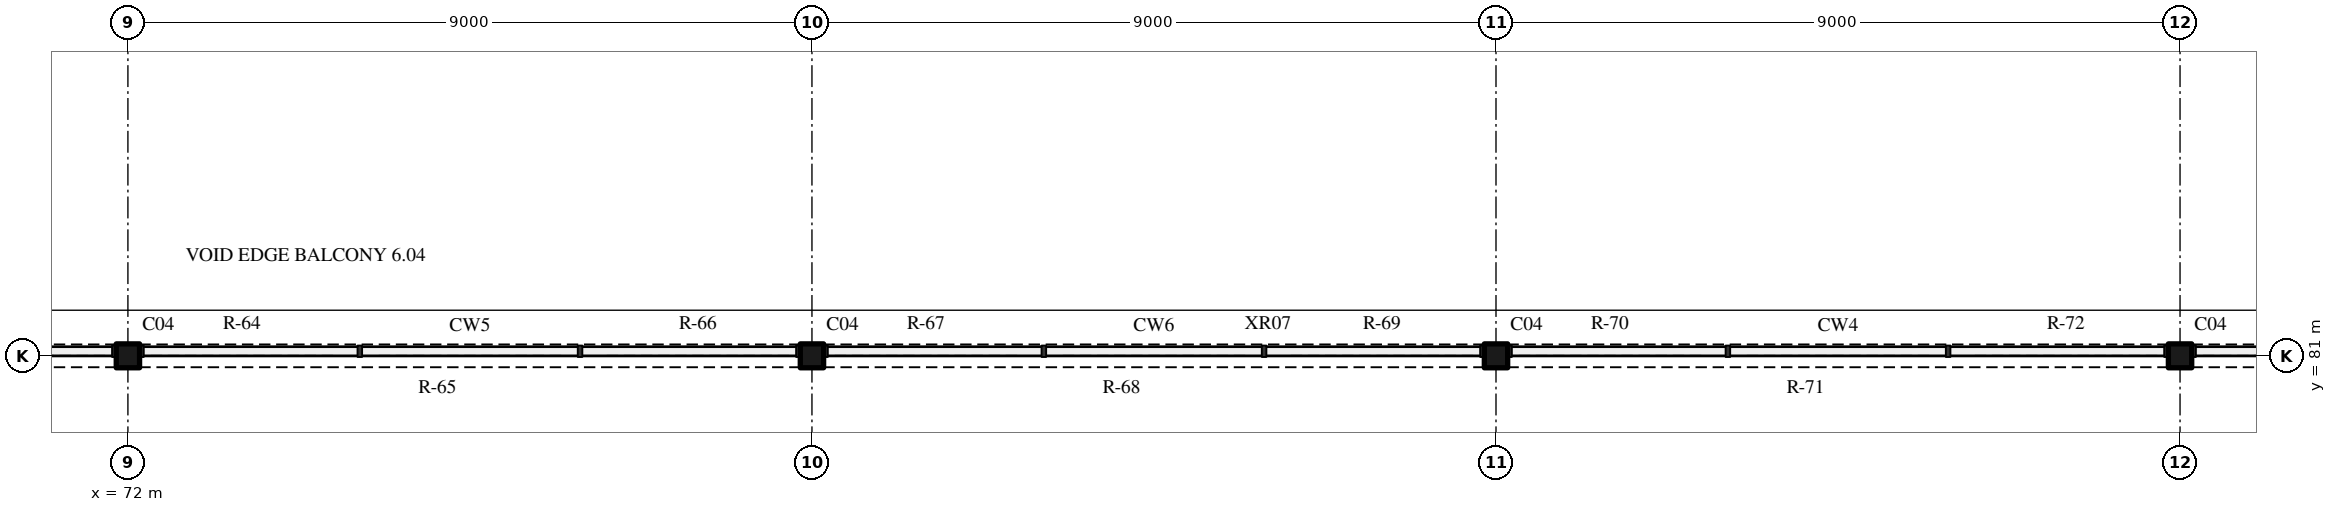
"""IFC4 building model, lengths in metres.
Left out: names, types, materials, properties, quantities, classifications, styles, units other than length and angle.
Written with IfcOpenShell. Run it as: python <this file> out.ifc"""

import sys

from ifc_helpers import new_model, si_unit, direction, frame, frame_2d, origin, origin_2d, place, context, subcontext, project, spatial, rectangle, i_section, extrude, element, fill, save


model = new_model("IFC4")
c1 = context("Model", 3, precision=1e-05, world=origin(), true_north=direction((0.0, 1.0)))
c2 = subcontext(c1, "Body", "Model", "MODEL_VIEW")
j1 = project(units=[si_unit("LENGTHUNIT", "METRE"), si_unit("PLANEANGLEUNIT", "RADIAN")], contexts=[c1])
p1 = place(None, origin())
s1 = spatial("IfcSite", under=j1, at=p1, CompositionType="ELEMENT")
p2 = place(p1, origin())
s2 = spatial("IfcBuilding", under=s1, at=p2, CompositionType="ELEMENT")
p3 = place(p2, frame((0.0, 0.0, 36.0)))
s3 = spatial("IfcBuildingStorey", under=s2, at=p3, CompositionType="ELEMENT", Elevation=36.0)
for number, where, z_axis, x_axis in (
    (1, (72.0, 81.0, 0.0), (0.0, 0.0, 1.0), (1.0, 0.0, 0.0)),
    (2, (81.0, 81.0, 0.0), (0.0, 0.0, 1.0), (1.0, 0.0, 0.0)),
    (3, (90.0, 81.0, 0.0), (0.0, 0.0, 1.0), (1.0, 0.0, 0.0)),
    (4, (99.0, 81.0, 0.0), (0.0, 0.0, 1.0), (1.0, 0.0, 0.0)),
):
    element("IfcColumn", number, at=place(p3, frame(where, z_axis=z_axis, x_axis=x_axis)), inside=s3, PredefinedType="COLUMN", context=c2, shape_type="SweptSolid", body=[
        extrude(i_section(OverallWidth=0.307, OverallDepth=0.315, WebThickness=0.012, FlangeThickness=0.019, FilletRadius=0.017, at=origin_2d()), origin(), (0.0, 0.0, 1.0), 8.0),
    ])
p4 = place(p3, frame((54.15, 81.0, 15.2), z_axis=(0.0, 0.0, 1.0), x_axis=(1.0, 0.0, 0.0)))
e5 = element("IfcWall", 5, at=p4, inside=s3, PredefinedType="SOLIDWALL", context=c2, shape_type="SweptSolid", body=[
    extrude(rectangle(XDim=62.7, YDim=0.3, at=frame_2d((31.35, 0.0))), origin(), (0.0, 0.0, 1.0), 0.9),
])
p5 = place(p4, frame((0.15, 0.0, 0.15)))
e6 = element("IfcOpeningElement", 6, at=p5, cuts=e5, PredefinedType="OPENING", context=c2, shape_type="SweptSolid", body=[
    extrude(rectangle(XDim=2.4, YDim=0.6, at=frame_2d((1.2, 0.3))), frame((0.0, 0.16, 0.0), z_axis=(0.0, -1.0, 0.0), x_axis=(1.0, 0.0, 0.0)), (0.0, 0.0, 1.0), 0.32),
])
p6 = place(p4, frame((3.15, 0.0, 0.15)))
e7 = element("IfcOpeningElement", 7, at=p6, cuts=e5, PredefinedType="OPENING", context=c2, shape_type="SweptSolid", body=[
    extrude(rectangle(XDim=2.4, YDim=0.6, at=frame_2d((1.2, 0.3))), frame((0.0, 0.16, 0.0), z_axis=(0.0, -1.0, 0.0), x_axis=(1.0, 0.0, 0.0)), (0.0, 0.0, 1.0), 0.32),
])
p7 = place(p4, frame((6.15, 0.0, 0.15)))
e8 = element("IfcOpeningElement", 8, at=p7, cuts=e5, PredefinedType="OPENING", context=c2, shape_type="SweptSolid", body=[
    extrude(rectangle(XDim=2.4, YDim=0.6, at=frame_2d((1.2, 0.3))), frame((0.0, 0.16, 0.0), z_axis=(0.0, -1.0, 0.0), x_axis=(1.0, 0.0, 0.0)), (0.0, 0.0, 1.0), 0.32),
])
p8 = place(p4, frame((9.15, 0.0, 0.15)))
e9 = element("IfcOpeningElement", 9, at=p8, cuts=e5, PredefinedType="OPENING", context=c2, shape_type="SweptSolid", body=[
    extrude(rectangle(XDim=2.4, YDim=0.6, at=frame_2d((1.2, 0.3))), frame((0.0, 0.16, 0.0), z_axis=(0.0, -1.0, 0.0), x_axis=(1.0, 0.0, 0.0)), (0.0, 0.0, 1.0), 0.32),
])
p9 = place(p4, frame((12.15, 0.0, 0.15)))
e10 = element("IfcOpeningElement", 10, at=p9, cuts=e5, PredefinedType="OPENING", context=c2, shape_type="SweptSolid", body=[
    extrude(rectangle(XDim=2.4, YDim=0.6, at=frame_2d((1.2, 0.3))), frame((0.0, 0.16, 0.0), z_axis=(0.0, -1.0, 0.0), x_axis=(1.0, 0.0, 0.0)), (0.0, 0.0, 1.0), 0.32),
])
p10 = place(p4, frame((15.15, 0.0, 0.15)))
e11 = element("IfcOpeningElement", 11, at=p10, cuts=e5, PredefinedType="OPENING", context=c2, shape_type="SweptSolid", body=[
    extrude(rectangle(XDim=2.4, YDim=0.6, at=frame_2d((1.2, 0.3))), frame((0.0, 0.16, 0.0), z_axis=(0.0, -1.0, 0.0), x_axis=(1.0, 0.0, 0.0)), (0.0, 0.0, 1.0), 0.32),
])
p11 = place(p4, frame((18.15, 0.0, 0.15)))
e12 = element("IfcOpeningElement", 12, at=p11, cuts=e5, PredefinedType="OPENING", context=c2, shape_type="SweptSolid", body=[
    extrude(rectangle(XDim=2.4, YDim=0.6, at=frame_2d((1.2, 0.3))), frame((0.0, 0.16, 0.0), z_axis=(0.0, -1.0, 0.0), x_axis=(1.0, 0.0, 0.0)), (0.0, 0.0, 1.0), 0.32),
])
p12 = place(p4, frame((21.15, 0.0, 0.15)))
e13 = element("IfcOpeningElement", 13, at=p12, cuts=e5, PredefinedType="OPENING", context=c2, shape_type="SweptSolid", body=[
    extrude(rectangle(XDim=2.4, YDim=0.6, at=frame_2d((1.2, 0.3))), frame((0.0, 0.16, 0.0), z_axis=(0.0, -1.0, 0.0), x_axis=(1.0, 0.0, 0.0)), (0.0, 0.0, 1.0), 0.32),
])
p13 = place(p4, frame((24.15, 0.0, 0.15)))
e14 = element("IfcOpeningElement", 14, at=p13, cuts=e5, PredefinedType="OPENING", context=c2, shape_type="SweptSolid", body=[
    extrude(rectangle(XDim=2.4, YDim=0.6, at=frame_2d((1.2, 0.3))), frame((0.0, 0.16, 0.0), z_axis=(0.0, -1.0, 0.0), x_axis=(1.0, 0.0, 0.0)), (0.0, 0.0, 1.0), 0.32),
])
p14 = place(p4, frame((27.15, 0.0, 0.15)))
e15 = element("IfcOpeningElement", 15, at=p14, cuts=e5, PredefinedType="OPENING", context=c2, shape_type="SweptSolid", body=[
    extrude(rectangle(XDim=2.4, YDim=0.6, at=frame_2d((1.2, 0.3))), frame((0.0, 0.16, 0.0), z_axis=(0.0, -1.0, 0.0), x_axis=(1.0, 0.0, 0.0)), (0.0, 0.0, 1.0), 0.32),
])
p15 = place(p4, frame((30.15, 0.0, 0.15)))
e16 = element("IfcOpeningElement", 16, at=p15, cuts=e5, PredefinedType="OPENING", context=c2, shape_type="SweptSolid", body=[
    extrude(rectangle(XDim=2.4, YDim=0.6, at=frame_2d((1.2, 0.3))), frame((0.0, 0.16, 0.0), z_axis=(0.0, -1.0, 0.0), x_axis=(1.0, 0.0, 0.0)), (0.0, 0.0, 1.0), 0.32),
])
p16 = place(p4, frame((33.15, 0.0, 0.15)))
e17 = element("IfcOpeningElement", 17, at=p16, cuts=e5, PredefinedType="OPENING", context=c2, shape_type="SweptSolid", body=[
    extrude(rectangle(XDim=2.4, YDim=0.6, at=frame_2d((1.2, 0.3))), frame((0.0, 0.16, 0.0), z_axis=(0.0, -1.0, 0.0), x_axis=(1.0, 0.0, 0.0)), (0.0, 0.0, 1.0), 0.32),
])
p17 = place(p4, frame((36.15, 0.0, 0.15)))
e18 = element("IfcOpeningElement", 18, at=p17, cuts=e5, PredefinedType="OPENING", context=c2, shape_type="SweptSolid", body=[
    extrude(rectangle(XDim=2.4, YDim=0.6, at=frame_2d((1.2, 0.3))), frame((0.0, 0.16, 0.0), z_axis=(0.0, -1.0, 0.0), x_axis=(1.0, 0.0, 0.0)), (0.0, 0.0, 1.0), 0.32),
])
p18 = place(p4, frame((39.15, 0.0, 0.15)))
e19 = element("IfcOpeningElement", 19, at=p18, cuts=e5, PredefinedType="OPENING", context=c2, shape_type="SweptSolid", body=[
    extrude(rectangle(XDim=2.4, YDim=0.6, at=frame_2d((1.2, 0.3))), frame((0.0, 0.16, 0.0), z_axis=(0.0, -1.0, 0.0), x_axis=(1.0, 0.0, 0.0)), (0.0, 0.0, 1.0), 0.32),
])
p19 = place(p4, frame((42.15, 0.0, 0.15)))
e20 = element("IfcOpeningElement", 20, at=p19, cuts=e5, PredefinedType="OPENING", context=c2, shape_type="SweptSolid", body=[
    extrude(rectangle(XDim=2.4, YDim=0.6, at=frame_2d((1.2, 0.3))), frame((0.0, 0.16, 0.0), z_axis=(0.0, -1.0, 0.0), x_axis=(1.0, 0.0, 0.0)), (0.0, 0.0, 1.0), 0.32),
])
p20 = place(p4, frame((45.15, 0.0, 0.15)))
e21 = element("IfcOpeningElement", 21, at=p20, cuts=e5, PredefinedType="OPENING", context=c2, shape_type="SweptSolid", body=[
    extrude(rectangle(XDim=2.4, YDim=0.6, at=frame_2d((1.2, 0.3))), frame((0.0, 0.16, 0.0), z_axis=(0.0, -1.0, 0.0), x_axis=(1.0, 0.0, 0.0)), (0.0, 0.0, 1.0), 0.32),
])
p21 = place(p4, frame((48.15, 0.0, 0.15)))
e22 = element("IfcOpeningElement", 22, at=p21, cuts=e5, PredefinedType="OPENING", context=c2, shape_type="SweptSolid", body=[
    extrude(rectangle(XDim=2.4, YDim=0.6, at=frame_2d((1.2, 0.3))), frame((0.0, 0.16, 0.0), z_axis=(0.0, -1.0, 0.0), x_axis=(1.0, 0.0, 0.0)), (0.0, 0.0, 1.0), 0.32),
])
p22 = place(p4, frame((51.15, 0.0, 0.15)))
e23 = element("IfcOpeningElement", 23, at=p22, cuts=e5, PredefinedType="OPENING", context=c2, shape_type="SweptSolid", body=[
    extrude(rectangle(XDim=2.4, YDim=0.6, at=frame_2d((1.2, 0.3))), frame((0.0, 0.16, 0.0), z_axis=(0.0, -1.0, 0.0), x_axis=(1.0, 0.0, 0.0)), (0.0, 0.0, 1.0), 0.32),
])
p23 = place(p4, frame((54.15, 0.0, 0.15)))
e24 = element("IfcOpeningElement", 24, at=p23, cuts=e5, PredefinedType="OPENING", context=c2, shape_type="SweptSolid", body=[
    extrude(rectangle(XDim=2.4, YDim=0.6, at=frame_2d((1.2, 0.3))), frame((0.0, 0.16, 0.0), z_axis=(0.0, -1.0, 0.0), x_axis=(1.0, 0.0, 0.0)), (0.0, 0.0, 1.0), 0.32),
])
p24 = place(p4, frame((57.15, 0.0, 0.15)))
e25 = element("IfcOpeningElement", 25, at=p24, cuts=e5, PredefinedType="OPENING", context=c2, shape_type="SweptSolid", body=[
    extrude(rectangle(XDim=2.4, YDim=0.6, at=frame_2d((1.2, 0.3))), frame((0.0, 0.16, 0.0), z_axis=(0.0, -1.0, 0.0), x_axis=(1.0, 0.0, 0.0)), (0.0, 0.0, 1.0), 0.32),
])
p25 = place(p4, frame((60.15, 0.0, 0.15)))
e26 = element("IfcOpeningElement", 26, at=p25, cuts=e5, PredefinedType="OPENING", context=c2, shape_type="SweptSolid", body=[
    extrude(rectangle(XDim=2.4, YDim=0.6, at=frame_2d((1.2, 0.3))), frame((0.0, 0.16, 0.0), z_axis=(0.0, -1.0, 0.0), x_axis=(1.0, 0.0, 0.0)), (0.0, 0.0, 1.0), 0.32),
])
p26 = place(p10, origin())
e27 = element("IfcWindow", 27, at=p26, inside=s3, PartitioningType="SINGLE_PANEL", PredefinedType="SKYLIGHT", context=c2, shape_type="SweptSolid", body=[
    extrude(rectangle(XDim=2.4, YDim=0.6, at=frame_2d((1.2, 0.3))), frame((0.0, 0.03, 0.0), z_axis=(0.0, -1.0, 0.0), x_axis=(1.0, 0.0, 0.0)), (0.0, 0.0, 1.0), 0.06),
])
fill(e11, e27)
p27 = place(p11, origin())
e28 = element("IfcWindow", 28, at=p27, inside=s3, PartitioningType="SINGLE_PANEL", PredefinedType="SKYLIGHT", context=c2, shape_type="SweptSolid", body=[
    extrude(rectangle(XDim=2.4, YDim=0.6, at=frame_2d((1.2, 0.3))), frame((0.0, 0.03, 0.0), z_axis=(0.0, -1.0, 0.0), x_axis=(1.0, 0.0, 0.0)), (0.0, 0.0, 1.0), 0.06),
])
fill(e12, e28)
p28 = place(p12, origin())
e29 = element("IfcWindow", 29, at=p28, inside=s3, PartitioningType="SINGLE_PANEL", PredefinedType="SKYLIGHT", context=c2, shape_type="SweptSolid", body=[
    extrude(rectangle(XDim=2.4, YDim=0.6, at=frame_2d((1.2, 0.3))), frame((0.0, 0.03, 0.0), z_axis=(0.0, -1.0, 0.0), x_axis=(1.0, 0.0, 0.0)), (0.0, 0.0, 1.0), 0.06),
])
fill(e13, e29)
p29 = place(p13, origin())
e30 = element("IfcWindow", 30, at=p29, inside=s3, PartitioningType="SINGLE_PANEL", PredefinedType="SKYLIGHT", context=c2, shape_type="SweptSolid", body=[
    extrude(rectangle(XDim=2.4, YDim=0.6, at=frame_2d((1.2, 0.3))), frame((0.0, 0.03, 0.0), z_axis=(0.0, -1.0, 0.0), x_axis=(1.0, 0.0, 0.0)), (0.0, 0.0, 1.0), 0.06),
])
fill(e14, e30)
p30 = place(p14, origin())
e31 = element("IfcWindow", 31, at=p30, inside=s3, PartitioningType="SINGLE_PANEL", PredefinedType="SKYLIGHT", context=c2, shape_type="SweptSolid", body=[
    extrude(rectangle(XDim=2.4, YDim=0.6, at=frame_2d((1.2, 0.3))), frame((0.0, 0.03, 0.0), z_axis=(0.0, -1.0, 0.0), x_axis=(1.0, 0.0, 0.0)), (0.0, 0.0, 1.0), 0.06),
])
fill(e15, e31)
p31 = place(p15, origin())
e32 = element("IfcWindow", 32, at=p31, inside=s3, PartitioningType="SINGLE_PANEL", PredefinedType="SKYLIGHT", context=c2, shape_type="SweptSolid", body=[
    extrude(rectangle(XDim=2.4, YDim=0.6, at=frame_2d((1.2, 0.3))), frame((0.0, 0.03, 0.0), z_axis=(0.0, -1.0, 0.0), x_axis=(1.0, 0.0, 0.0)), (0.0, 0.0, 1.0), 0.06),
])
fill(e16, e32)
p32 = place(p16, origin())
e33 = element("IfcWindow", 33, at=p32, inside=s3, PartitioningType="SINGLE_PANEL", PredefinedType="SKYLIGHT", context=c2, shape_type="SweptSolid", body=[
    extrude(rectangle(XDim=2.4, YDim=0.6, at=frame_2d((1.2, 0.3))), frame((0.0, 0.03, 0.0), z_axis=(0.0, -1.0, 0.0), x_axis=(1.0, 0.0, 0.0)), (0.0, 0.0, 1.0), 0.06),
])
fill(e17, e33)
p33 = place(p17, origin())
e34 = element("IfcWindow", 34, at=p33, inside=s3, PartitioningType="SINGLE_PANEL", PredefinedType="SKYLIGHT", context=c2, shape_type="SweptSolid", body=[
    extrude(rectangle(XDim=2.4, YDim=0.6, at=frame_2d((1.2, 0.3))), frame((0.0, 0.03, 0.0), z_axis=(0.0, -1.0, 0.0), x_axis=(1.0, 0.0, 0.0)), (0.0, 0.0, 1.0), 0.06),
])
fill(e18, e34)
p34 = place(p18, origin())
e35 = element("IfcWindow", 35, at=p34, inside=s3, PartitioningType="SINGLE_PANEL", PredefinedType="SKYLIGHT", context=c2, shape_type="SweptSolid", body=[
    extrude(rectangle(XDim=2.4, YDim=0.6, at=frame_2d((1.2, 0.3))), frame((0.0, 0.03, 0.0), z_axis=(0.0, -1.0, 0.0), x_axis=(1.0, 0.0, 0.0)), (0.0, 0.0, 1.0), 0.06),
])
fill(e19, e35)
p35 = place(p19, origin())
e36 = element("IfcWindow", 36, at=p35, inside=s3, PartitioningType="SINGLE_PANEL", PredefinedType="SKYLIGHT", context=c2, shape_type="SweptSolid", body=[
    extrude(rectangle(XDim=2.4, YDim=0.6, at=frame_2d((1.2, 0.3))), frame((0.0, 0.03, 0.0), z_axis=(0.0, -1.0, 0.0), x_axis=(1.0, 0.0, 0.0)), (0.0, 0.0, 1.0), 0.06),
])
fill(e20, e36)
p36 = place(p20, origin())
e37 = element("IfcWindow", 37, at=p36, inside=s3, PartitioningType="SINGLE_PANEL", PredefinedType="SKYLIGHT", context=c2, shape_type="SweptSolid", body=[
    extrude(rectangle(XDim=2.4, YDim=0.6, at=frame_2d((1.2, 0.3))), frame((0.0, 0.03, 0.0), z_axis=(0.0, -1.0, 0.0), x_axis=(1.0, 0.0, 0.0)), (0.0, 0.0, 1.0), 0.06),
])
fill(e21, e37)
save(model, sys.argv[1])
